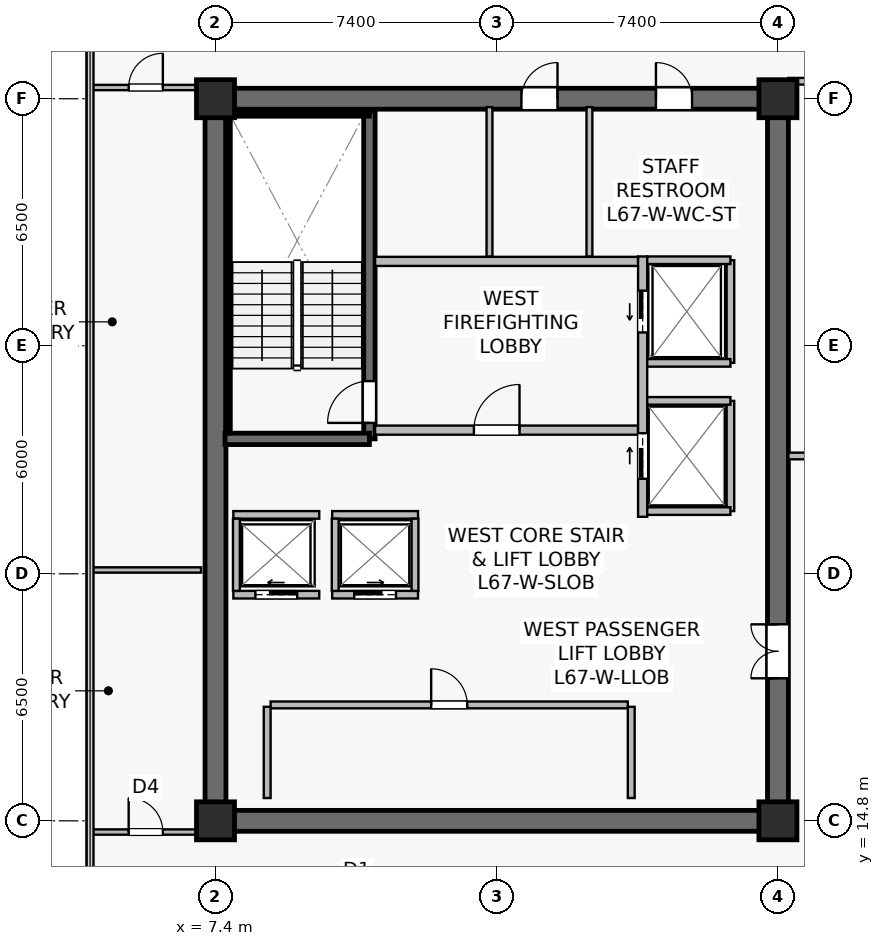
"""IFC4 building model, lengths in metres.
Left out: names, types, materials, properties, quantities, classifications, styles, units other than length and angle.
Written with IfcOpenShell. Run it as: python <this file> out.ifc"""

import sys

from ifc_helpers import new_model, si_unit, direction, frame, frame_2d, origin, origin_2d, place, context, subcontext, project, spatial, rectangle, extrude, source, transform, mapped, element, fill, save


model = new_model("IFC4")
c1 = context("Model", 3, precision=1e-05, world=origin(), true_north=direction((0.0, 1.0)))
c2 = subcontext(c1, "Body", "Model", "MODEL_VIEW")
j1 = project(units=[si_unit("LENGTHUNIT", "METRE"), si_unit("PLANEANGLEUNIT", "RADIAN")], contexts=[c1])
p1 = place(None, origin())
s1 = spatial("IfcSite", under=j1, at=p1, CompositionType="ELEMENT")
p2 = place(p1, origin())
s2 = spatial("IfcBuilding", under=s1, at=p2, CompositionType="ELEMENT")
p3 = place(p2, frame((0.0, 0.0, 279.3)))
s3 = spatial("IfcBuildingStorey", under=s2, at=p3, CompositionType="ELEMENT", Elevation=279.3)
p4 = place(p3, frame((7.125, 14.8, 0.0), z_axis=(0.0, 0.0, 1.0), x_axis=(1.0, 0.0, 0.0)))
e1 = element("IfcWall", 1, at=p4, inside=s3, PredefinedType="SHEAR", context=c2, shape_type="SweptSolid", body=[
    extrude(rectangle(XDim=15.35, YDim=0.55, at=frame_2d((7.675, 0.0))), origin(), (0.0, 0.0, 1.0), 3.8),
])
p5 = place(p3, frame((7.125, 33.8, 0.0), z_axis=(0.0, 0.0, 1.0), x_axis=(1.0, 0.0, 0.0)))
e2 = element("IfcWall", 2, at=p5, inside=s3, PredefinedType="SHEAR", context=c2, shape_type="SweptSolid", body=[
    extrude(rectangle(XDim=15.35, YDim=0.55, at=frame_2d((7.675, 0.0))), origin(), (0.0, 0.0, 1.0), 3.8),
])
p6 = place(p5, frame((8.325, 0.0, 0.0)))
e3 = element("IfcOpeningElement", 3, at=p6, cuts=e2, PredefinedType="OPENING", context=c2, shape_type="SweptSolid", body=[
    extrude(rectangle(XDim=0.95, YDim=2.15, at=frame_2d((0.475, 1.075))), frame((0.0, 0.285, 0.0), z_axis=(0.0, -1.0, 0.0), x_axis=(1.0, 0.0, 0.0)), (0.0, 0.0, 1.0), 0.57),
])
p7 = place(p5, frame((11.865, 0.0, 0.0)))
e4 = element("IfcOpeningElement", 4, at=p7, cuts=e2, PredefinedType="OPENING", context=c2, shape_type="SweptSolid", body=[
    extrude(rectangle(XDim=0.95, YDim=2.15, at=frame_2d((0.475, 1.075))), frame((0.0, 0.285, 0.0), z_axis=(0.0, -1.0, 0.0), x_axis=(1.0, 0.0, 0.0)), (0.0, 0.0, 1.0), 0.57),
])
p8 = place(p3, frame((7.4, 15.075, 0.0), z_axis=(0.0, 0.0, 1.0), x_axis=(0.0, 1.0, 0.0)))
e5 = element("IfcWall", 5, at=p8, inside=s3, PredefinedType="SHEAR", context=c2, shape_type="SweptSolid", body=[
    extrude(rectangle(XDim=18.45, YDim=0.55, at=frame_2d((9.225, 0.0))), origin(), (0.0, 0.0, 1.0), 3.8),
])
p9 = place(p3, frame((22.2, 15.075, 0.0), z_axis=(0.0, 0.0, 1.0), x_axis=(0.0, 1.0, 0.0)))
e6 = element("IfcWall", 6, at=p9, inside=s3, PredefinedType="SHEAR", context=c2, shape_type="SweptSolid", body=[
    extrude(rectangle(XDim=18.45, YDim=0.55, at=frame_2d((9.225, 0.0))), origin(), (0.0, 0.0, 1.0), 3.8),
])
p10 = place(p9, frame((3.475, 0.0, 0.0)))
e7 = element("IfcOpeningElement", 7, at=p10, cuts=e6, PredefinedType="OPENING", context=c2, shape_type="SweptSolid", body=[
    extrude(rectangle(XDim=1.42, YDim=2.2, at=frame_2d((0.71, 1.1))), frame((0.0, 0.285, 0.0), z_axis=(0.0, -1.0, 0.0), x_axis=(1.0, 0.0, 0.0)), (0.0, 0.0, 1.0), 0.57),
])
p11 = place(p3, frame((11.45, 24.85, 0.0), z_axis=(0.0, 0.0, 1.0), x_axis=(0.0, 1.0, 0.0)))
e8 = element("IfcWall", 8, at=p11, inside=s3, PredefinedType="SHEAR", context=c2, shape_type="SweptSolid", body=[
    extrude(rectangle(XDim=8.63, YDim=0.3, at=frame_2d((4.315, 0.0))), origin(), (0.0, 0.0, 1.0), 3.8),
])
p12 = place(p11, frame((0.42, 0.0, 0.0)))
e9 = element("IfcOpeningElement", 9, at=p12, cuts=e8, PredefinedType="OPENING", context=c2, shape_type="SweptSolid", body=[
    extrude(rectangle(XDim=1.1, YDim=2.15, at=frame_2d((0.55, 1.075))), frame((0.0, 0.16, 0.0), z_axis=(0.0, -1.0, 0.0), x_axis=(1.0, 0.0, 0.0)), (0.0, 0.0, 1.0), 0.32),
])
p13 = place(p3, frame((7.65, 24.85, 0.0), z_axis=(0.0, 0.0, 1.0), x_axis=(1.0, 0.0, 0.0)))
e10 = element("IfcWall", 10, at=p13, inside=s3, PredefinedType="SHEAR", context=c2, shape_type="SweptSolid", body=[
    extrude(rectangle(XDim=3.8, YDim=0.3, at=frame_2d((1.9, 0.0))), origin(), (0.0, 0.0, 1.0), 3.8),
])
p14 = place(p3, frame((7.73, 33.4, 0.0), z_axis=(0.0, 0.0, 1.0), x_axis=(1.0, 0.0, 0.0)))
e11 = element("IfcWall", 11, at=p14, inside=s3, PredefinedType="SOLIDWALL", context=c2, shape_type="SweptSolid", body=[
    extrude(rectangle(XDim=3.72, YDim=0.12, at=frame_2d((1.86, 0.0))), origin(), (0.0, 0.0, 1.0), 3.8),
])
p15 = place(p3, frame((7.73, 25.0, 0.0), z_axis=(0.0, 0.0, 1.0), x_axis=(0.0, 1.0, 0.0)))
e12 = element("IfcWall", 12, at=p15, inside=s3, PredefinedType="SOLIDWALL", context=c2, shape_type="SweptSolid", body=[
    extrude(rectangle(XDim=8.32, YDim=0.12, at=frame_2d((4.16, 0.0))), origin(), (0.0, 0.0, 1.0), 3.8),
])
m1 = source(origin(), c2, "Body", "SweptSolid", [
    extrude(rectangle(XDim=1.0, YDim=1.0, at=origin_2d()), origin(), (0.0, 0.0, 1.0), 4.1),
])
for number, where, z_axis, x_axis in (
    (13, (7.4, 14.8, 0.0), (0.0, 0.0, 1.0), (1.0, 0.0, 0.0)),
    (14, (22.2, 14.8, 0.0), (0.0, 0.0, 1.0), (1.0, 0.0, 0.0)),
    (15, (7.4, 33.8, 0.0), (0.0, 0.0, 1.0), (1.0, 0.0, 0.0)),
    (16, (22.2, 33.8, 0.0), (0.0, 0.0, 1.0), (1.0, 0.0, 0.0)),
):
    element("IfcColumn", number, at=place(p3, frame(where, z_axis=z_axis, x_axis=x_axis)), inside=s3, PredefinedType="COLUMN", context=c2, shape_type="MappedRepresentation", body=[
        mapped(m1, transform((0.0, 0.0, 0.0), scale=1.0)),
    ])
p16 = place(p3, frame((11.6, 25.08, 0.0), z_axis=(0.0, 0.0, 1.0), x_axis=(1.0, 0.0, 0.0)))
e17 = element("IfcWall", 17, at=p16, inside=s3, PredefinedType="SOLIDWALL", context=c2, shape_type="SweptSolid", body=[
    extrude(rectangle(XDim=6.92, YDim=0.24, at=frame_2d((3.46, 0.0))), origin(), (0.0, 0.0, 1.0), 3.197),
])
p17 = place(p16, frame((2.6, 0.0, 0.0)))
e18 = element("IfcOpeningElement", 18, at=p17, cuts=e17, PredefinedType="OPENING", context=c2, shape_type="SweptSolid", body=[
    extrude(rectangle(XDim=1.2, YDim=2.16, at=frame_2d((0.6, 1.08))), frame((0.0, 0.13, 0.0), z_axis=(0.0, -1.0, 0.0), x_axis=(1.0, 0.0, 0.0)), (0.0, 0.0, 1.0), 0.26),
])
p18 = place(p3, frame((11.6, 29.52, 0.0), z_axis=(0.0, 0.0, 1.0), x_axis=(1.0, 0.0, 0.0)))
e19 = element("IfcWall", 19, at=p18, inside=s3, PredefinedType="SOLIDWALL", context=c2, shape_type="SweptSolid", body=[
    extrude(rectangle(XDim=6.92, YDim=0.24, at=frame_2d((3.46, 0.0))), origin(), (0.0, 0.0, 1.0), 3.197),
])
p19 = place(p3, frame((18.64, 22.8, 0.0), z_axis=(0.0, 0.0, 1.0), x_axis=(0.0, 1.0, 0.0)))
e20 = element("IfcWall", 20, at=p19, inside=s3, PredefinedType="SOLIDWALL", context=c2, shape_type="SweptSolid", body=[
    extrude(rectangle(XDim=6.85, YDim=0.24, at=frame_2d((3.425, 0.0))), origin(), (0.0, 0.0, 1.0), 2.935),
])
p20 = place(p19, frame((4.85, 0.0, 0.0)))
e21 = element("IfcOpeningElement", 21, at=p20, cuts=e20, PredefinedType="OPENING", context=c2, shape_type="SweptSolid", body=[
    extrude(rectangle(XDim=1.1, YDim=2.22, at=frame_2d((0.55, 1.11))), frame((0.0, 0.13, 0.0), z_axis=(0.0, -1.0, 0.0), x_axis=(1.0, 0.0, 0.0)), (0.0, 0.0, 1.0), 0.26),
])
p21 = place(p19, frame((1.0, 0.0, 0.0)))
e22 = element("IfcOpeningElement", 22, at=p21, cuts=e20, PredefinedType="OPENING", context=c2, shape_type="SweptSolid", body=[
    extrude(rectangle(XDim=1.2, YDim=2.22, at=frame_2d((0.6, 1.11))), frame((0.0, 0.13, 0.0), z_axis=(0.0, -1.0, 0.0), x_axis=(1.0, 0.0, 0.0)), (0.0, 0.0, 1.0), 0.26),
])
p22 = place(p3, frame((7.87, 20.75, 0.0), z_axis=(0.0, 0.0, 1.0), x_axis=(1.0, 0.0, 0.0)))
e23 = element("IfcWall", 23, at=p22, inside=s3, PredefinedType="SOLIDWALL", context=c2, shape_type="SweptSolid", body=[
    extrude(rectangle(XDim=2.26, YDim=0.2, at=frame_2d((1.13, 0.0))), origin(), (0.0, 0.0, 1.0), 3.8),
])
p23 = place(p22, frame((0.58, 0.0, 0.0)))
e24 = element("IfcOpeningElement", 24, at=p23, cuts=e23, PredefinedType="OPENING", context=c2, shape_type="SweptSolid", body=[
    extrude(rectangle(XDim=1.1, YDim=2.22, at=frame_2d((0.55, 1.11))), frame((0.0, 0.11, 0.0), z_axis=(0.0, -1.0, 0.0), x_axis=(1.0, 0.0, 0.0)), (0.0, 0.0, 1.0), 0.22),
])
p24 = place(p3, frame((7.87, 22.85, 0.0), z_axis=(0.0, 0.0, 1.0), x_axis=(1.0, 0.0, 0.0)))
e25 = element("IfcWall", 25, at=p24, inside=s3, PredefinedType="SOLIDWALL", context=c2, shape_type="SweptSolid", body=[
    extrude(rectangle(XDim=2.26, YDim=0.2, at=frame_2d((1.13, 0.0))), origin(), (0.0, 0.0, 1.0), 3.8),
])
p25 = place(p3, frame((7.95, 20.85, 0.0), z_axis=(0.0, 0.0, 1.0), x_axis=(0.0, 1.0, 0.0)))
e26 = element("IfcWall", 26, at=p25, inside=s3, PredefinedType="SOLIDWALL", context=c2, shape_type="SweptSolid", body=[
    extrude(rectangle(XDim=1.9, YDim=0.18, at=frame_2d((0.95, 0.0))), origin(), (0.0, 0.0, 1.0), 3.8),
])
p26 = place(p3, frame((10.47, 20.75, 0.0), z_axis=(0.0, 0.0, 1.0), x_axis=(1.0, 0.0, 0.0)))
e27 = element("IfcWall", 27, at=p26, inside=s3, PredefinedType="SOLIDWALL", context=c2, shape_type="SweptSolid", body=[
    extrude(rectangle(XDim=2.26, YDim=0.2, at=frame_2d((1.13, 0.0))), origin(), (0.0, 0.0, 1.0), 3.8),
])
p27 = place(p26, frame((0.58, 0.0, 0.0)))
e28 = element("IfcOpeningElement", 28, at=p27, cuts=e27, PredefinedType="OPENING", context=c2, shape_type="SweptSolid", body=[
    extrude(rectangle(XDim=1.1, YDim=2.22, at=frame_2d((0.55, 1.11))), frame((0.0, 0.11, 0.0), z_axis=(0.0, -1.0, 0.0), x_axis=(1.0, 0.0, 0.0)), (0.0, 0.0, 1.0), 0.22),
])
p28 = place(p3, frame((10.47, 22.85, 0.0), z_axis=(0.0, 0.0, 1.0), x_axis=(1.0, 0.0, 0.0)))
e29 = element("IfcWall", 29, at=p28, inside=s3, PredefinedType="SOLIDWALL", context=c2, shape_type="SweptSolid", body=[
    extrude(rectangle(XDim=2.26, YDim=0.2, at=frame_2d((1.13, 0.0))), origin(), (0.0, 0.0, 1.0), 3.8),
])
for number, where, z_axis, x_axis in (
    (30, (10.55, 20.85, 0.0), (0.0, 0.0, 1.0), (0.0, 1.0, 0.0)),
    (31, (12.65, 20.85, 0.0), (0.0, 0.0, 1.0), (0.0, 1.0, 0.0)),
):
    element("IfcWall", number, at=place(p3, frame(where, z_axis=z_axis, x_axis=x_axis)), inside=s3, PredefinedType="SOLIDWALL", context=c2, shape_type="SweptSolid", body=[
        extrude(rectangle(XDim=1.9, YDim=0.18, at=frame_2d((0.95, 0.0))), origin(), (0.0, 0.0, 1.0), 3.8),
    ])
p29 = place(p3, frame((20.95, 26.85, 0.0), z_axis=(0.0, 0.0, 1.0), x_axis=(0.0, 1.0, 0.0)))
e32 = element("IfcWall", 32, at=p29, inside=s3, PredefinedType="SOLIDWALL", context=c2, shape_type="SweptSolid", body=[
    extrude(rectangle(XDim=2.7, YDim=0.2, at=frame_2d((1.35, 0.0))), origin(), (0.0, 0.0, 1.0), 3.8),
])
p30 = place(p3, frame((18.76, 29.55, 0.0), z_axis=(0.0, 0.0, 1.0), x_axis=(1.0, 0.0, 0.0)))
e33 = element("IfcWall", 33, at=p30, inside=s3, PredefinedType="SOLIDWALL", context=c2, shape_type="SweptSolid", body=[
    extrude(rectangle(XDim=2.19, YDim=0.2, at=frame_2d((1.095, 0.0))), origin(), (0.0, 0.0, 1.0), 3.8),
])
p31 = place(p3, frame((18.76, 26.85, 0.0), z_axis=(0.0, 0.0, 1.0), x_axis=(1.0, 0.0, 0.0)))
e34 = element("IfcWall", 34, at=p31, inside=s3, PredefinedType="SOLIDWALL", context=c2, shape_type="SweptSolid", body=[
    extrude(rectangle(XDim=2.19, YDim=0.2, at=frame_2d((1.095, 0.0))), origin(), (0.0, 0.0, 1.0), 3.197),
])
p32 = place(p3, frame((20.95, 22.95, 0.0), z_axis=(0.0, 0.0, 1.0), x_axis=(0.0, 1.0, 0.0)))
e35 = element("IfcWall", 35, at=p32, inside=s3, PredefinedType="SOLIDWALL", context=c2, shape_type="SweptSolid", body=[
    extrude(rectangle(XDim=2.9, YDim=0.2, at=frame_2d((1.45, 0.0))), origin(), (0.0, 0.0, 1.0), 2.935),
])
for number, where, z_axis, x_axis in (
    (36, (18.76, 25.85, 0.0), (0.0, 0.0, 1.0), (1.0, 0.0, 0.0)),
    (37, (18.76, 22.95, 0.0), (0.0, 0.0, 1.0), (1.0, 0.0, 0.0)),
):
    element("IfcWall", number, at=place(p3, frame(where, z_axis=z_axis, x_axis=x_axis)), inside=s3, PredefinedType="SOLIDWALL", context=c2, shape_type="SweptSolid", body=[
        extrude(rectangle(XDim=2.19, YDim=0.2, at=frame_2d((1.095, 0.0))), origin(), (0.0, 0.0, 1.0), 3.8),
    ])
p33 = place(p3, frame((8.85, 17.85, 0.0), z_axis=(0.0, 0.0, 1.0), x_axis=(1.0, 0.0, 0.0)))
e38 = element("IfcWall", 38, at=p33, inside=s3, PredefinedType="SOLIDWALL", context=c2, shape_type="SweptSolid", body=[
    extrude(rectangle(XDim=9.4, YDim=0.18, at=frame_2d((4.7, 0.0))), origin(), (0.0, 0.0, 1.0), 3.197),
])
p34 = place(p33, frame((4.225, 0.0, 0.0)))
e39 = element("IfcOpeningElement", 39, at=p34, cuts=e38, PredefinedType="OPENING", context=c2, shape_type="SweptSolid", body=[
    extrude(rectangle(XDim=0.95, YDim=2.15, at=frame_2d((0.475, 1.075))), frame((0.0, 0.1, 0.0), z_axis=(0.0, -1.0, 0.0), x_axis=(1.0, 0.0, 0.0)), (0.0, 0.0, 1.0), 0.2),
])
for number, where, z_axis, x_axis in (
    (40, (18.34, 15.4, 0.0), (0.0, 0.0, 1.0), (0.0, 1.0, 0.0)),
    (41, (8.76, 15.4, 0.0), (0.0, 0.0, 1.0), (0.0, 1.0, 0.0)),
):
    element("IfcWall", number, at=place(p3, frame(where, z_axis=z_axis, x_axis=x_axis)), inside=s3, PredefinedType="SOLIDWALL", context=c2, shape_type="SweptSolid", body=[
        extrude(rectangle(XDim=2.4, YDim=0.18, at=frame_2d((1.2, 0.0))), origin(), (0.0, 0.0, 1.0), 3.8),
    ])
p35 = place(p3, frame((14.61, 29.65, 0.0), z_axis=(0.0, 0.0, 1.0), x_axis=(0.0, 1.0, 0.0)))
e42 = element("IfcWall", 42, at=p35, inside=s3, PredefinedType="PLUMBINGWALL", context=c2, shape_type="SweptSolid", body=[
    extrude(rectangle(XDim=3.93, YDim=0.155, at=frame_2d((1.965, 0.0))), origin(), (0.0, 0.0, 1.0), 3.197),
])
p36 = place(p3, frame((17.24, 29.65, 0.0), z_axis=(0.0, 0.0, 1.0), x_axis=(0.0, 1.0, 0.0)))
e43 = element("IfcWall", 43, at=p36, inside=s3, PredefinedType="PLUMBINGWALL", context=c2, shape_type="SweptSolid", body=[
    extrude(rectangle(XDim=3.93, YDim=0.155, at=frame_2d((1.965, 0.0))), origin(), (0.0, 0.0, 1.0), 3.8),
])
p37 = place(p3, frame((22.475, 34.26, 0.0), z_axis=(0.0, 0.0, 1.0), x_axis=(1.0, 0.0, 0.0)))
e44 = element("IfcWall", 44, at=p37, inside=s3, PredefinedType="PARTITIONING", context=c2, shape_type="SweptSolid", body=[
    extrude(rectangle(XDim=4.025, YDim=0.175, at=frame_2d((2.012, 0.0))), origin(), (0.0, 0.0, 1.0), 3.535),
])
p38 = place(p3, frame((22.475, 24.4, 0.0), z_axis=(0.0, 0.0, 1.0), x_axis=(1.0, 0.0, 0.0)))
e45 = element("IfcWall", 45, at=p38, inside=s3, PredefinedType="PARTITIONING", context=c2, shape_type="SweptSolid", body=[
    extrude(rectangle(XDim=4.025, YDim=0.175, at=frame_2d((2.012, 0.0))), origin(), (0.0, 0.0, 1.0), 3.8),
])
p39 = place(p38, frame((1.35, 0.0, 0.0)))
e46 = element("IfcOpeningElement", 46, at=p39, cuts=e45, PredefinedType="OPENING", context=c2, shape_type="SweptSolid", body=[
    extrude(rectangle(XDim=0.95, YDim=2.15, at=frame_2d((0.475, 1.075))), frame((0.0, 0.098, 0.0), z_axis=(0.0, -1.0, 0.0), x_axis=(1.0, 0.0, 0.0)), (0.0, 0.0, 1.0), 0.195),
])
p40 = place(p3, frame((4.11, 21.4, 0.0), z_axis=(0.0, 0.0, 1.0), x_axis=(1.0, 0.0, 0.0)))
e47 = element("IfcWall", 47, at=p40, inside=s3, PredefinedType="PARTITIONING", context=c2, shape_type="SweptSolid", body=[
    extrude(rectangle(XDim=2.91, YDim=0.14, at=frame_2d((1.455, 0.0))), origin(), (0.0, 0.0, 1.0), 3.8),
])
p41 = place(p3, frame((4.11, 14.505, 0.0), z_axis=(0.0, 0.0, 1.0), x_axis=(1.0, 0.0, 0.0)))
e48 = element("IfcWall", 48, at=p41, inside=s3, PredefinedType="PARTITIONING", context=c2, shape_type="SweptSolid", body=[
    extrude(rectangle(XDim=2.91, YDim=0.14, at=frame_2d((1.455, 0.0))), origin(), (0.0, 0.0, 1.0), 3.8),
])
p42 = place(p41, frame((1.005, 0.0, 0.0)))
e49 = element("IfcOpeningElement", 49, at=p42, cuts=e48, PredefinedType="OPENING", context=c2, shape_type="SweptSolid", body=[
    extrude(rectangle(XDim=0.9, YDim=2.1, at=frame_2d((0.45, 1.05))), frame((0.0, 0.08, 0.0), z_axis=(0.0, -1.0, 0.0), x_axis=(1.0, 0.0, 0.0)), (0.0, 0.0, 1.0), 0.16),
])
p43 = place(p3, frame((4.11, 34.095, 0.0), z_axis=(0.0, 0.0, 1.0), x_axis=(1.0, 0.0, 0.0)))
e50 = element("IfcWall", 50, at=p43, inside=s3, PredefinedType="PARTITIONING", context=c2, shape_type="SweptSolid", body=[
    extrude(rectangle(XDim=2.91, YDim=0.14, at=frame_2d((1.455, 0.0))), origin(), (0.0, 0.0, 1.0), 3.8),
])
p44 = place(p43, frame((1.005, 0.0, 0.0)))
e51 = element("IfcOpeningElement", 51, at=p44, cuts=e50, PredefinedType="OPENING", context=c2, shape_type="SweptSolid", body=[
    extrude(rectangle(XDim=0.9, YDim=2.1, at=frame_2d((0.45, 1.05))), frame((0.0, 0.08, 0.0), z_axis=(0.0, -1.0, 0.0), x_axis=(1.0, 0.0, 0.0)), (0.0, 0.0, 1.0), 0.16),
])
m2 = source(origin(), c2, "Body", "SweptSolid", [
    extrude(rectangle(XDim=1.1, YDim=2.15, at=frame_2d((0.55, 1.075))), frame((0.0, 0.025, 0.0), z_axis=(0.0, -1.0, 0.0), x_axis=(1.0, 0.0, 0.0)), (0.0, 0.0, 1.0), 0.05),
])
p45 = place(p12, origin())
e52 = element("IfcDoor", 52, at=p45, inside=s3, OperationType="SINGLE_SWING_LEFT", PredefinedType="DOOR", context=c2, shape_type="MappedRepresentation", body=[
    mapped(m2, transform((0.0, 0.0, 0.0), scale=1.0)),
])
fill(e9, e52)
m3 = source(origin(), c2, "Body", "SweptSolid", [
    extrude(rectangle(XDim=1.2, YDim=2.16, at=frame_2d((0.6, 1.08))), frame((0.0, 0.025, 0.0), z_axis=(0.0, -1.0, 0.0), x_axis=(1.0, 0.0, 0.0)), (0.0, 0.0, 1.0), 0.05),
])
p46 = place(p17, origin())
e53 = element("IfcDoor", 53, at=p46, inside=s3, OperationType="SINGLE_SWING_RIGHT", PredefinedType="DOOR", context=c2, shape_type="MappedRepresentation", body=[
    mapped(m3, transform((0.0, 0.0, 0.0), scale=1.0)),
])
fill(e18, e53)
m4 = source(origin(), c2, "Body", "SweptSolid", [
    extrude(rectangle(XDim=1.1, YDim=2.22, at=frame_2d((0.55, 1.11))), frame((0.0, 0.025, 0.0), z_axis=(0.0, -1.0, 0.0), x_axis=(1.0, 0.0, 0.0)), (0.0, 0.0, 1.0), 0.05),
])
p47 = place(p23, origin())
e54 = element("IfcDoor", 54, at=p47, inside=s3, OperationType="SLIDING_TO_LEFT", PredefinedType="USERDEFINED", context=c2, shape_type="MappedRepresentation", body=[
    mapped(m4, transform((0.0, 0.0, 0.0), scale=1.0)),
])
fill(e24, e54)
p48 = place(p27, origin())
e55 = element("IfcDoor", 55, at=p48, inside=s3, OperationType="SLIDING_TO_RIGHT", PredefinedType="USERDEFINED", context=c2, shape_type="MappedRepresentation", body=[
    mapped(m4, transform((0.0, 0.0, 0.0), scale=1.0)),
])
fill(e28, e55)
p49 = place(p20, origin())
e56 = element("IfcDoor", 56, at=p49, inside=s3, OperationType="SLIDING_TO_LEFT", PredefinedType="USERDEFINED", context=c2, shape_type="MappedRepresentation", body=[
    mapped(m4, transform((0.0, 0.0, 0.0), scale=1.0)),
])
fill(e21, e56)
m5 = source(origin(), c2, "Body", "SweptSolid", [
    extrude(rectangle(XDim=1.2, YDim=2.22, at=frame_2d((0.6, 1.11))), frame((0.0, 0.025, 0.0), z_axis=(0.0, -1.0, 0.0), x_axis=(1.0, 0.0, 0.0)), (0.0, 0.0, 1.0), 0.05),
])
p50 = place(p21, origin())
e57 = element("IfcDoor", 57, at=p50, inside=s3, OperationType="SLIDING_TO_RIGHT", PredefinedType="USERDEFINED", context=c2, shape_type="MappedRepresentation", body=[
    mapped(m5, transform((0.0, 0.0, 0.0), scale=1.0)),
])
fill(e22, e57)
m6 = source(origin(), c2, "Body", "SweptSolid", [
    extrude(rectangle(XDim=0.95, YDim=2.15, at=frame_2d((0.475, 1.075))), frame((0.0, 0.025, 0.0), z_axis=(0.0, -1.0, 0.0), x_axis=(1.0, 0.0, 0.0)), (0.0, 0.0, 1.0), 0.05),
])
p51 = place(p34, origin())
e58 = element("IfcDoor", 58, at=p51, inside=s3, OperationType="SINGLE_SWING_LEFT", PredefinedType="DOOR", context=c2, shape_type="MappedRepresentation", body=[
    mapped(m6, transform((0.0, 0.0, 0.0), scale=1.0)),
])
fill(e39, e58)
m7 = source(origin(), c2, "Body", "SweptSolid", [
    extrude(rectangle(XDim=1.42, YDim=2.2, at=frame_2d((0.71, 1.1))), frame((0.0, 0.025, 0.0), z_axis=(0.0, -1.0, 0.0), x_axis=(1.0, 0.0, 0.0)), (0.0, 0.0, 1.0), 0.05),
])
p52 = place(p10, origin())
e59 = element("IfcDoor", 59, at=p52, inside=s3, OperationType="DOUBLE_DOOR_SINGLE_SWING", PredefinedType="DOOR", context=c2, shape_type="MappedRepresentation", body=[
    mapped(m7, transform((0.0, 0.0, 0.0), scale=1.0)),
])
fill(e7, e59)
p53 = place(p6, origin())
e60 = element("IfcDoor", 60, at=p53, inside=s3, OperationType="SINGLE_SWING_RIGHT", PredefinedType="DOOR", context=c2, shape_type="MappedRepresentation", body=[
    mapped(m6, transform((0.0, 0.0, 0.0), scale=1.0)),
])
fill(e3, e60)
p54 = place(p7, origin())
e61 = element("IfcDoor", 61, at=p54, inside=s3, OperationType="SINGLE_SWING_LEFT", PredefinedType="DOOR", context=c2, shape_type="MappedRepresentation", body=[
    mapped(m6, transform((0.0, 0.0, 0.0), scale=1.0)),
])
fill(e4, e61)
m8 = source(origin(), c2, "Body", "SweptSolid", [
    extrude(rectangle(XDim=0.9, YDim=2.1, at=frame_2d((0.45, 1.05))), frame((0.0, 0.025, 0.0), z_axis=(0.0, -1.0, 0.0), x_axis=(1.0, 0.0, 0.0)), (0.0, 0.0, 1.0), 0.05),
])
p55 = place(p42, origin())
e62 = element("IfcDoor", 62, at=p55, inside=s3, OperationType="SINGLE_SWING_LEFT", PredefinedType="DOOR", context=c2, shape_type="MappedRepresentation", body=[
    mapped(m8, transform((0.0, 0.0, 0.0), scale=1.0)),
])
fill(e49, e62)
p56 = place(p44, origin())
e63 = element("IfcDoor", 63, at=p56, inside=s3, OperationType="SINGLE_SWING_RIGHT", PredefinedType="DOOR", context=c2, shape_type="MappedRepresentation", body=[
    mapped(m8, transform((0.0, 0.0, 0.0), scale=1.0)),
])
fill(e51, e63)
save(model, sys.argv[1])
